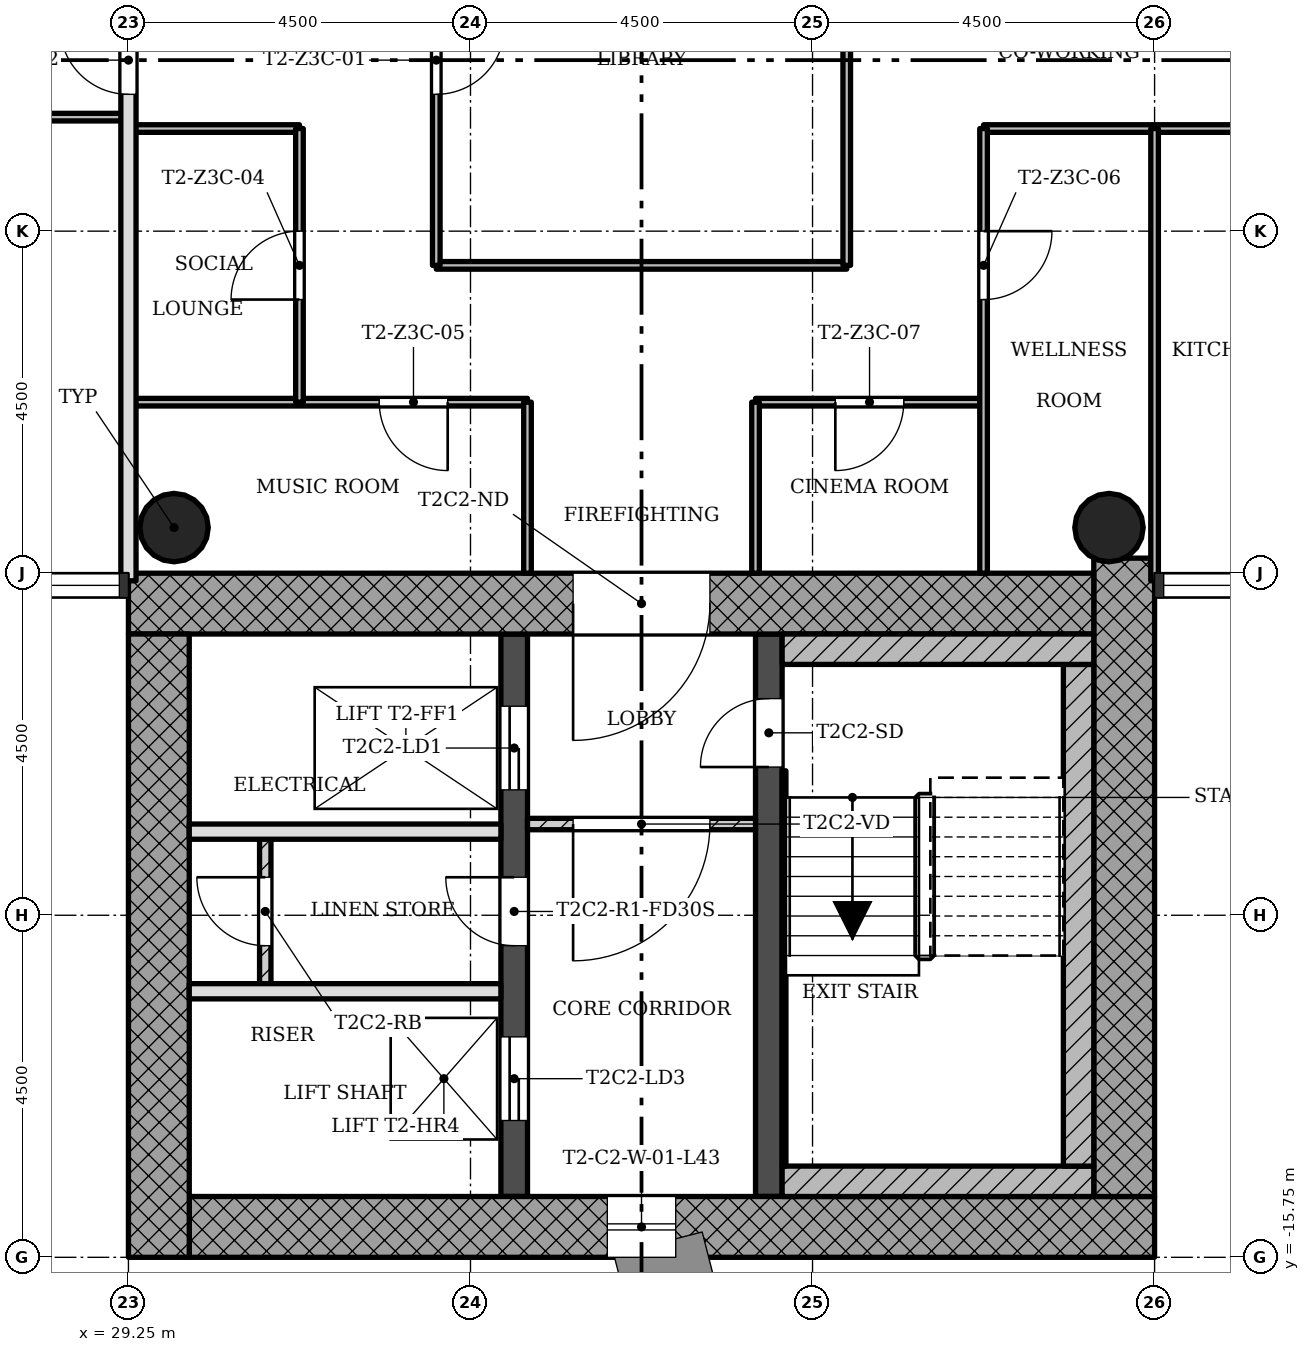
"""IFC4 building model, lengths in metres.
Left out: names, types, materials, properties, quantities, classifications, styles, units other than length and angle.
Written with IfcOpenShell. Run it as: python <this file> out.ifc"""

import sys

from ifc_helpers import new_model, si_unit, direction, frame, frame_2d, origin, origin_2d, place, context, subcontext, project, spatial, rectangle, hollow_circle, extrude, element, fill, save


model = new_model("IFC4")
c1 = context("Model", 3, precision=1e-05, world=origin(), true_north=direction((0.0, 1.0)))
c2 = subcontext(c1, "Body", "Model", "MODEL_VIEW")
j1 = project(units=[si_unit("LENGTHUNIT", "METRE"), si_unit("PLANEANGLEUNIT", "RADIAN")], contexts=[c1])
p1 = place(None, origin())
s1 = spatial("IfcSite", under=j1, at=p1, CompositionType="ELEMENT")
p2 = place(p1, origin())
s2 = spatial("IfcBuilding", under=s1, at=p2, CompositionType="ELEMENT")
p3 = place(p2, frame((0.0, 0.0, 157.5)))
s3 = spatial("IfcBuildingStorey", under=s2, at=p3, CompositionType="ELEMENT", Elevation=157.5)
p4 = place(p3, frame((30.05, -15.35, 0.0), z_axis=(0.0, 0.0, 1.0), x_axis=(1.0, 0.0, 0.0)))
e1 = element("IfcWall", 1, at=p4, inside=s3, PredefinedType="SHEAR", context=c2, shape_type="SweptSolid", body=[
    extrude(rectangle(XDim=12.7, YDim=0.8, at=frame_2d((6.35, 0.0))), origin(), (0.0, 0.0, 1.0), 3.4),
])
p5 = place(p4, frame((5.5, 0.0, 0.45)))
e2 = element("IfcOpeningElement", 2, at=p5, cuts=e1, PredefinedType="OPENING", context=c2, shape_type="SweptSolid", body=[
    extrude(rectangle(XDim=0.9, YDim=2.4, at=frame_2d((0.45, 1.2))), frame((0.0, 0.41, 0.0), z_axis=(0.0, -1.0, 0.0), x_axis=(1.0, 0.0, 0.0)), (0.0, 0.0, 1.0), 0.82),
])
p6 = place(p3, frame((42.35, -14.95, 0.0), z_axis=(0.0, 0.0, 1.0), x_axis=(0.0, 1.0, 0.0)))
e3 = element("IfcWall", 3, at=p6, inside=s3, PredefinedType="SHEAR", context=c2, shape_type="SweptSolid", body=[
    extrude(rectangle(XDim=8.398, YDim=0.8, at=frame_2d((4.199, 0.0))), origin(), (0.0, 0.0, 1.0), 3.4),
])
p7 = place(p3, frame((41.95, -7.15, 0.0), z_axis=(0.0, 0.0, 1.0), x_axis=(-1.0, 0.0, 0.0)))
e4 = element("IfcWall", 4, at=p7, inside=s3, PredefinedType="SHEAR", context=c2, shape_type="SweptSolid", body=[
    extrude(rectangle(XDim=12.7, YDim=0.8, at=frame_2d((6.35, 0.0))), origin(), (0.0, 0.0, 1.0), 3.4),
])
p8 = place(p7, frame((5.05, 0.0, 0.0)))
e5 = element("IfcOpeningElement", 5, at=p8, cuts=e4, PredefinedType="OPENING", context=c2, shape_type="SweptSolid", body=[
    extrude(rectangle(XDim=1.8, YDim=2.1, at=frame_2d((0.9, 1.05))), frame((0.0, 0.41, 0.0), z_axis=(0.0, -1.0, 0.0), x_axis=(1.0, 0.0, 0.0)), (0.0, 0.0, 1.0), 0.82),
])
p9 = place(p3, frame((29.65, -7.55, 0.0), z_axis=(0.0, 0.0, 1.0), x_axis=(0.0, -1.0, 0.0)))
e6 = element("IfcWall", 6, at=p9, inside=s3, PredefinedType="SHEAR", context=c2, shape_type="SweptSolid", body=[
    extrude(rectangle(XDim=8.2, YDim=0.8, at=frame_2d((4.1, 0.0))), origin(), (0.0, 0.0, 1.0), 3.4),
])
p10 = place(p3, frame((34.325, -14.95, 0.0), z_axis=(0.0, 0.0, 1.0), x_axis=(0.0, 1.0, 0.0)))
e7 = element("IfcWall", 7, at=p10, inside=s3, PredefinedType="SHEAR", context=c2, shape_type="SweptSolid", body=[
    extrude(rectangle(XDim=7.4, YDim=0.35, at=frame_2d((3.7, 0.0))), origin(), (0.0, 0.0, 1.0), 3.4),
])
p11 = place(p10, frame((5.35, 0.0, 0.0)))
e8 = element("IfcOpeningElement", 8, at=p11, cuts=e7, PredefinedType="OPENING", context=c2, shape_type="SweptSolid", body=[
    extrude(rectangle(XDim=1.1, YDim=2.1, at=frame_2d((0.55, 1.05))), frame((0.0, 0.185, 0.0), z_axis=(0.0, -1.0, 0.0), x_axis=(1.0, 0.0, 0.0)), (0.0, 0.0, 1.0), 0.37),
])
p12 = place(p10, frame((1.0, 0.0, 0.0)))
e9 = element("IfcOpeningElement", 9, at=p12, cuts=e7, PredefinedType="OPENING", context=c2, shape_type="SweptSolid", body=[
    extrude(rectangle(XDim=1.1, YDim=2.1, at=frame_2d((0.55, 1.05))), frame((0.0, 0.185, 0.0), z_axis=(0.0, -1.0, 0.0), x_axis=(1.0, 0.0, 0.0)), (0.0, 0.0, 1.0), 0.37),
])
p13 = place(p10, frame((3.3, 0.0, 0.0)))
e10 = element("IfcOpeningElement", 10, at=p13, cuts=e7, PredefinedType="OPENING", context=c2, shape_type="SweptSolid", body=[
    extrude(rectangle(XDim=0.9, YDim=2.1, at=frame_2d((0.45, 1.05))), frame((0.0, 0.185, 0.0), z_axis=(0.0, -1.0, 0.0), x_axis=(1.0, 0.0, 0.0)), (0.0, 0.0, 1.0), 0.37),
])
p14 = place(p3, frame((37.675, -14.95, 0.0), z_axis=(0.0, 0.0, 1.0), x_axis=(0.0, 1.0, 0.0)))
e11 = element("IfcWall", 11, at=p14, inside=s3, PredefinedType="SHEAR", context=c2, shape_type="SweptSolid", body=[
    extrude(rectangle(XDim=7.4, YDim=0.35, at=frame_2d((3.7, 0.0))), origin(), (0.0, 0.0, 1.0), 3.4),
])
p15 = place(p14, frame((5.65, 0.0, 0.0)))
e12 = element("IfcOpeningElement", 12, at=p15, cuts=e11, PredefinedType="OPENING", context=c2, shape_type="SweptSolid", body=[
    extrude(rectangle(XDim=0.9, YDim=2.1, at=frame_2d((0.45, 1.05))), frame((0.0, 0.185, 0.0), z_axis=(0.0, -1.0, 0.0), x_axis=(1.0, 0.0, 0.0)), (0.0, 0.0, 1.0), 0.37),
])
for number, where, z_axis, x_axis in (
    (13, (42.15, -6.15, 0.0), (0.0, 0.0, 1.0), (1.0, 0.0, 0.0)),
    (14, (29.85, -6.15, 0.0), (0.0, 0.0, 1.0), (1.0, 0.0, 0.0)),
):
    element("IfcColumn", number, at=place(p3, frame(where, z_axis=z_axis, x_axis=x_axis)), inside=s3, PredefinedType="COLUMN", context=c2, shape_type="SweptSolid", body=[
        extrude(hollow_circle(Radius=0.45, WallThickness=0.032, at=origin_2d()), origin(), (0.0, 0.0, 1.0), 3.4),
    ])
p16 = place(p3, frame((34.5, -10.05, 0.0), z_axis=(0.0, 0.0, 1.0), x_axis=(1.0, 0.0, 0.0)))
e15 = element("IfcWall", 15, at=p16, inside=s3, PredefinedType="PARTITIONING", context=c2, shape_type="SweptSolid", body=[
    extrude(rectangle(XDim=3.0, YDim=0.15, at=frame_2d((1.5, 0.0))), origin(), (0.0, 0.0, 1.0), 3.0),
])
p17 = place(p16, frame((0.6, 0.0, 0.0)))
e16 = element("IfcOpeningElement", 16, at=p17, cuts=e15, PredefinedType="OPENING", context=c2, shape_type="SweptSolid", body=[
    extrude(rectangle(XDim=1.8, YDim=2.1, at=frame_2d((0.9, 1.05))), frame((0.0, 0.085, 0.0), z_axis=(0.0, -1.0, 0.0), x_axis=(1.0, 0.0, 0.0)), (0.0, 0.0, 1.0), 0.17),
])
for number, where, z_axis, x_axis in (
    (17, (30.05, -12.25, 0.0), (0.0, 0.0, 1.0), (1.0, 0.0, 0.0)),
    (18, (30.05, -10.15, 0.0), (0.0, 0.0, 1.0), (1.0, 0.0, 0.0)),
):
    element("IfcWall", number, at=place(p3, frame(where, z_axis=z_axis, x_axis=x_axis)), inside=s3, PredefinedType="SOLIDWALL", context=c2, shape_type="SweptSolid", body=[
        extrude(rectangle(XDim=4.1, YDim=0.2, at=frame_2d((2.05, 0.0))), origin(), (0.0, 0.0, 1.0), 3.0),
    ])
p18 = place(p3, frame((31.05, -10.15, 0.0), z_axis=(0.0, 0.0, 1.0), x_axis=(0.0, -1.0, 0.0)))
e19 = element("IfcWall", 19, at=p18, inside=s3, PredefinedType="PARTITIONING", context=c2, shape_type="SweptSolid", body=[
    extrude(rectangle(XDim=2.1, YDim=0.15, at=frame_2d((1.05, 0.0))), origin(), (0.0, 0.0, 1.0), 3.0),
])
p19 = place(p18, frame((0.6, 0.0, 0.0)))
e20 = element("IfcOpeningElement", 20, at=p19, cuts=e19, PredefinedType="OPENING", context=c2, shape_type="SweptSolid", body=[
    extrude(rectangle(XDim=0.9, YDim=2.1, at=frame_2d((0.45, 1.05))), frame((0.0, 0.085, 0.0), z_axis=(0.0, -1.0, 0.0), x_axis=(1.0, 0.0, 0.0)), (0.0, 0.0, 1.0), 0.17),
])
p20 = place(p3, frame((40.5, -4.5, 0.0), z_axis=(0.0, 0.0, 1.0), x_axis=(-1.0, 0.0, 0.0)))
e21 = element("IfcWall", 21, at=p20, inside=s3, PredefinedType="PARTITIONING", context=c2, shape_type="SweptSolid", body=[
    extrude(rectangle(XDim=3.0, YDim=0.1, at=frame_2d((1.5, 0.0))), origin(), (0.0, 0.0, 1.0), 3.0),
])
p21 = place(p20, frame((1.05, 0.0, 0.0)))
e22 = element("IfcOpeningElement", 22, at=p21, cuts=e21, PredefinedType="OPENING", context=c2, shape_type="SweptSolid", body=[
    extrude(rectangle(XDim=0.9, YDim=2.1, at=frame_2d((0.45, 1.05))), frame((0.0, 0.06, 0.0), z_axis=(0.0, -1.0, 0.0), x_axis=(1.0, 0.0, 0.0)), (0.0, 0.0, 1.0), 0.12),
])
p22 = place(p3, frame((34.5, -4.5, 0.0), z_axis=(0.0, 0.0, 1.0), x_axis=(-1.0, 0.0, 0.0)))
e23 = element("IfcWall", 23, at=p22, inside=s3, PredefinedType="PARTITIONING", context=c2, shape_type="SweptSolid", body=[
    extrude(rectangle(XDim=5.25, YDim=0.1, at=frame_2d((2.625, 0.0))), origin(), (0.0, 0.0, 1.0), 3.0),
])
p23 = place(p22, frame((1.05, 0.0, 0.0)))
e24 = element("IfcOpeningElement", 24, at=p23, cuts=e23, PredefinedType="OPENING", context=c2, shape_type="SweptSolid", body=[
    extrude(rectangle(XDim=0.9, YDim=2.1, at=frame_2d((0.45, 1.05))), frame((0.0, 0.06, 0.0), z_axis=(0.0, -1.0, 0.0), x_axis=(1.0, 0.0, 0.0)), (0.0, 0.0, 1.0), 0.12),
])
p24 = place(p3, frame((38.7, -2.7, 0.0), z_axis=(0.0, 0.0, 1.0), x_axis=(-1.0, 0.0, 0.0)))
e25 = element("IfcWall", 25, at=p24, inside=s3, PredefinedType="PARTITIONING", context=c2, shape_type="SweptSolid", body=[
    extrude(rectangle(XDim=5.4, YDim=0.1, at=frame_2d((2.7, 0.0))), origin(), (0.0, 0.0, 1.0), 3.0),
])
p25 = place(p3, frame((44.55, -0.9, 0.0), z_axis=(0.0, 0.0, 1.0), x_axis=(-1.0, 0.0, 0.0)))
e26 = element("IfcWall", 26, at=p25, inside=s3, PredefinedType="PARTITIONING", context=c2, shape_type="SweptSolid", body=[
    extrude(rectangle(XDim=4.05, YDim=0.1, at=frame_2d((2.025, 0.0))), origin(), (0.0, 0.0, 1.0), 3.0),
])
p26 = place(p3, frame((31.5, -0.9, 0.0), z_axis=(0.0, 0.0, 1.0), x_axis=(-1.0, 0.0, 0.0)))
e27 = element("IfcWall", 27, at=p26, inside=s3, PredefinedType="PARTITIONING", context=c2, shape_type="SweptSolid", body=[
    extrude(rectangle(XDim=2.25, YDim=0.1, at=frame_2d((1.125, 0.0))), origin(), (0.0, 0.0, 1.0), 3.0),
])
p27 = place(p3, frame((29.25, -0.75, 0.0), z_axis=(0.0, 0.0, 1.0), x_axis=(-1.0, 0.0, 0.0)))
e28 = element("IfcWall", 28, at=p27, inside=s3, PredefinedType="PARTITIONING", context=c2, shape_type="SweptSolid", body=[
    extrude(rectangle(XDim=4.5, YDim=0.1, at=frame_2d((2.25, 0.0))), origin(), (0.0, 0.0, 1.0), 3.0),
])
p28 = place(p27, frame((1.8, 0.0, 0.0)))
e29 = element("IfcOpeningElement", 29, at=p28, cuts=e28, PredefinedType="OPENING", context=c2, shape_type="SweptSolid", body=[
    extrude(rectangle(XDim=0.9, YDim=2.1, at=frame_2d((0.45, 1.05))), frame((0.0, 0.06, 0.0), z_axis=(0.0, -1.0, 0.0), x_axis=(1.0, 0.0, 0.0)), (0.0, 0.0, 1.0), 0.12),
])
p29 = place(p3, frame((42.75, -6.85, 0.0), z_axis=(0.0, 0.0, 1.0), x_axis=(0.0, 1.0, 0.0)))
e30 = element("IfcWall", 30, at=p29, inside=s3, PredefinedType="PARTITIONING", context=c2, shape_type="SweptSolid", body=[
    extrude(rectangle(XDim=5.95, YDim=0.1, at=frame_2d((2.975, 0.0))), origin(), (0.0, 0.0, 1.0), 3.0),
])
p30 = place(p3, frame((40.5, -6.75, 0.0), z_axis=(0.0, 0.0, 1.0), x_axis=(0.0, 1.0, 0.0)))
e31 = element("IfcWall", 31, at=p30, inside=s3, PredefinedType="PARTITIONING", context=c2, shape_type="SweptSolid", body=[
    extrude(rectangle(XDim=5.85, YDim=0.1, at=frame_2d((2.925, 0.0))), origin(), (0.0, 0.0, 1.0), 3.0),
])
p31 = place(p30, frame((3.6, 0.0, 0.0)))
e32 = element("IfcOpeningElement", 32, at=p31, cuts=e31, PredefinedType="OPENING", context=c2, shape_type="SweptSolid", body=[
    extrude(rectangle(XDim=0.9, YDim=2.1, at=frame_2d((0.45, 1.05))), frame((0.0, 0.06, 0.0), z_axis=(0.0, -1.0, 0.0), x_axis=(1.0, 0.0, 0.0)), (0.0, 0.0, 1.0), 0.12),
])
p32 = place(p3, frame((38.7, -2.7, 0.0), z_axis=(0.0, 0.0, 1.0), x_axis=(0.0, 1.0, 0.0)))
e33 = element("IfcWall", 33, at=p32, inside=s3, PredefinedType="PARTITIONING", context=c2, shape_type="SweptSolid", body=[
    extrude(rectangle(XDim=5.4, YDim=0.1, at=frame_2d((2.7, 0.0))), origin(), (0.0, 0.0, 1.0), 3.0),
])
for number, where, z_axis, x_axis in (
    (34, (37.5, -6.75, 0.0), (0.0, 0.0, 1.0), (0.0, 1.0, 0.0)),
    (35, (34.5, -6.75, 0.0), (0.0, 0.0, 1.0), (0.0, 1.0, 0.0)),
):
    element("IfcWall", number, at=place(p3, frame(where, z_axis=z_axis, x_axis=x_axis)), inside=s3, PredefinedType="PARTITIONING", context=c2, shape_type="SweptSolid", body=[
        extrude(rectangle(XDim=2.25, YDim=0.1, at=frame_2d((1.125, 0.0))), origin(), (0.0, 0.0, 1.0), 3.0),
    ])
p33 = place(p3, frame((33.3, -2.7, 0.0), z_axis=(0.0, 0.0, 1.0), x_axis=(0.0, 1.0, 0.0)))
e36 = element("IfcWall", 36, at=p33, inside=s3, PredefinedType="PARTITIONING", context=c2, shape_type="SweptSolid", body=[
    extrude(rectangle(XDim=5.4, YDim=0.1, at=frame_2d((2.7, 0.0))), origin(), (0.0, 0.0, 1.0), 3.0),
])
p34 = place(p33, frame((2.25, 0.0, 0.0)))
e37 = element("IfcOpeningElement", 37, at=p34, cuts=e36, PredefinedType="OPENING", context=c2, shape_type="SweptSolid", body=[
    extrude(rectangle(XDim=0.9, YDim=2.1, at=frame_2d((0.45, 1.05))), frame((0.0, 0.06, 0.0), z_axis=(0.0, -1.0, 0.0), x_axis=(1.0, 0.0, 0.0)), (0.0, 0.0, 1.0), 0.12),
])
p35 = place(p3, frame((31.5, -4.5, 0.0), z_axis=(0.0, 0.0, 1.0), x_axis=(0.0, 1.0, 0.0)))
e38 = element("IfcWall", 38, at=p35, inside=s3, PredefinedType="PARTITIONING", context=c2, shape_type="SweptSolid", body=[
    extrude(rectangle(XDim=3.6, YDim=0.1, at=frame_2d((1.8, 0.0))), origin(), (0.0, 0.0, 1.0), 3.0),
])
p36 = place(p35, frame((1.35, 0.0, 0.0)))
e39 = element("IfcOpeningElement", 39, at=p36, cuts=e38, PredefinedType="OPENING", context=c2, shape_type="SweptSolid", body=[
    extrude(rectangle(XDim=0.9, YDim=2.1, at=frame_2d((0.45, 1.05))), frame((0.0, 0.06, 0.0), z_axis=(0.0, -1.0, 0.0), x_axis=(1.0, 0.0, 0.0)), (0.0, 0.0, 1.0), 0.12),
])
p37 = place(p3, frame((29.25, -6.85, 0.0), z_axis=(0.0, 0.0, 1.0), x_axis=(0.0, 1.0, 0.0)))
e40 = element("IfcWall", 40, at=p37, inside=s3, PredefinedType="SOLIDWALL", context=c2, shape_type="SweptSolid", body=[
    extrude(rectangle(XDim=13.7, YDim=0.2, at=frame_2d((6.85, 0.0))), origin(), (0.0, 0.0, 1.0), 3.0),
])
p38 = place(p37, frame((6.4, 0.0, 0.0)))
e41 = element("IfcOpeningElement", 41, at=p38, cuts=e40, PredefinedType="OPENING", context=c2, shape_type="SweptSolid", body=[
    extrude(rectangle(XDim=0.9, YDim=2.1, at=frame_2d((0.45, 1.05))), frame((0.0, 0.11, 0.0), z_axis=(0.0, -1.0, 0.0), x_axis=(1.0, 0.0, 0.0)), (0.0, 0.0, 1.0), 0.22),
])
p39 = place(p3, frame((37.85, -14.75, 0.0), z_axis=(0.0, 0.0, 1.0), x_axis=(1.0, 0.0, 0.0)))
e42 = element("IfcWall", 42, at=p39, inside=s3, PredefinedType="SHEAR", context=c2, shape_type="SweptSolid", body=[
    extrude(rectangle(XDim=4.1, YDim=0.4, at=frame_2d((2.05, 0.0))), origin(), (0.0, 0.0, 1.0), 3.4),
])
p40 = place(p3, frame((41.75, -7.95, 0.0), z_axis=(0.0, 0.0, 1.0), x_axis=(0.0, -1.0, 0.0)))
e43 = element("IfcWall", 43, at=p40, inside=s3, PredefinedType="SHEAR", context=c2, shape_type="SweptSolid", body=[
    extrude(rectangle(XDim=6.6, YDim=0.4, at=frame_2d((3.3, 0.0))), origin(), (0.0, 0.0, 1.0), 3.4),
])
p41 = place(p3, frame((37.85, -7.75, 0.0), z_axis=(0.0, 0.0, 1.0), x_axis=(1.0, 0.0, 0.0)))
e44 = element("IfcWall", 44, at=p41, inside=s3, PredefinedType="SHEAR", context=c2, shape_type="SweptSolid", body=[
    extrude(rectangle(XDim=4.1, YDim=0.4, at=frame_2d((2.05, 0.0))), origin(), (0.0, 0.0, 1.0), 3.4),
])
p42 = place(p3, frame((37.875, -9.35, 0.0), z_axis=(0.0, 0.0, 1.0), x_axis=(0.0, -1.0, 0.0)))
e45 = element("IfcWall", 45, at=p42, inside=s3, PredefinedType="SHEAR", context=c2, shape_type="SweptSolid", body=[
    extrude(rectangle(XDim=5.2, YDim=0.05, at=frame_2d((2.6, 0.0))), origin(), (0.0, 0.0, 1.0), 3.4),
])
p43 = place(p5, origin())
e46 = element("IfcWindow", 46, at=p43, inside=s3, PartitioningType="SINGLE_PANEL", PredefinedType="WINDOW", context=c2, shape_type="SweptSolid", body=[
    extrude(rectangle(XDim=0.9, YDim=2.4, at=frame_2d((0.45, 1.2))), frame((0.0, 0.03, 0.0), z_axis=(0.0, -1.0, 0.0), x_axis=(1.0, 0.0, 0.0)), (0.0, 0.0, 1.0), 0.06),
])
fill(e2, e46)
p44 = place(p17, origin())
e47 = element("IfcDoor", 47, at=p44, inside=s3, OperationType="SINGLE_SWING_LEFT", PredefinedType="DOOR", context=c2, shape_type="SweptSolid", body=[
    extrude(rectangle(XDim=1.8, YDim=2.1, at=frame_2d((0.9, 1.05))), frame((0.0, 0.025, 0.0), z_axis=(0.0, -1.0, 0.0), x_axis=(1.0, 0.0, 0.0)), (0.0, 0.0, 1.0), 0.05),
])
fill(e16, e47)
p45 = place(p19, origin())
e48 = element("IfcDoor", 48, at=p45, inside=s3, OperationType="SINGLE_SWING_LEFT", PredefinedType="DOOR", context=c2, shape_type="SweptSolid", body=[
    extrude(rectangle(XDim=0.9, YDim=2.1, at=frame_2d((0.45, 1.05))), frame((0.0, 0.025, 0.0), z_axis=(0.0, -1.0, 0.0), x_axis=(1.0, 0.0, 0.0)), (0.0, 0.0, 1.0), 0.05),
])
fill(e20, e48)
p46 = place(p34, origin())
e49 = element("IfcDoor", 49, at=p46, inside=s3, OperationType="SINGLE_SWING_RIGHT", PredefinedType="DOOR", context=c2, shape_type="SweptSolid", body=[
    extrude(rectangle(XDim=0.9, YDim=2.1, at=frame_2d((0.45, 1.05))), frame((0.0, 0.025, 0.0), z_axis=(0.0, -1.0, 0.0), x_axis=(1.0, 0.0, 0.0)), (0.0, 0.0, 1.0), 0.05),
])
fill(e37, e49)
p47 = place(p36, origin())
e50 = element("IfcDoor", 50, at=p47, inside=s3, OperationType="SINGLE_SWING_RIGHT", PredefinedType="DOOR", context=c2, shape_type="SweptSolid", body=[
    extrude(rectangle(XDim=0.9, YDim=2.1, at=frame_2d((0.45, 1.05))), frame((0.0, 0.025, 0.0), z_axis=(0.0, -1.0, 0.0), x_axis=(1.0, 0.0, 0.0)), (0.0, 0.0, 1.0), 0.05),
])
fill(e39, e50)
p48 = place(p23, origin())
e51 = element("IfcDoor", 51, at=p48, inside=s3, OperationType="SINGLE_SWING_RIGHT", PredefinedType="DOOR", context=c2, shape_type="SweptSolid", body=[
    extrude(rectangle(XDim=0.9, YDim=2.1, at=frame_2d((0.45, 1.05))), frame((0.0, 0.025, 0.0), z_axis=(0.0, -1.0, 0.0), x_axis=(1.0, 0.0, 0.0)), (0.0, 0.0, 1.0), 0.05),
])
fill(e24, e51)
p49 = place(p31, origin())
e52 = element("IfcDoor", 52, at=p49, inside=s3, OperationType="SINGLE_SWING_RIGHT", PredefinedType="DOOR", context=c2, shape_type="SweptSolid", body=[
    extrude(rectangle(XDim=0.9, YDim=2.1, at=frame_2d((0.45, 1.05))), frame((0.0, 0.025, 0.0), z_axis=(0.0, -1.0, 0.0), x_axis=(1.0, 0.0, 0.0)), (0.0, 0.0, 1.0), 0.05),
])
fill(e32, e52)
p50 = place(p21, origin())
e53 = element("IfcDoor", 53, at=p50, inside=s3, OperationType="SINGLE_SWING_LEFT", PredefinedType="DOOR", context=c2, shape_type="SweptSolid", body=[
    extrude(rectangle(XDim=0.9, YDim=2.1, at=frame_2d((0.45, 1.05))), frame((0.0, 0.025, 0.0), z_axis=(0.0, -1.0, 0.0), x_axis=(1.0, 0.0, 0.0)), (0.0, 0.0, 1.0), 0.05),
])
fill(e22, e53)
p51 = place(p38, origin())
e54 = element("IfcDoor", 54, at=p51, inside=s3, OperationType="SINGLE_SWING_LEFT", PredefinedType="DOOR", context=c2, shape_type="SweptSolid", body=[
    extrude(rectangle(XDim=0.9, YDim=2.1, at=frame_2d((0.45, 1.05))), frame((0.0, 0.025, 0.0), z_axis=(0.0, -1.0, 0.0), x_axis=(1.0, 0.0, 0.0)), (0.0, 0.0, 1.0), 0.05),
])
fill(e41, e54)
p52 = place(p15, origin())
e55 = element("IfcDoor", 55, at=p52, inside=s3, OperationType="SINGLE_SWING_RIGHT", PredefinedType="DOOR", context=c2, shape_type="SweptSolid", body=[
    extrude(rectangle(XDim=0.9, YDim=2.1, at=frame_2d((0.45, 1.05))), frame((0.0, 0.025, 0.0), z_axis=(0.0, -1.0, 0.0), x_axis=(1.0, 0.0, 0.0)), (0.0, 0.0, 1.0), 0.05),
])
fill(e12, e55)
p53 = place(p11, origin())
e56 = element("IfcDoor", 56, at=p53, inside=s3, OperationType="SLIDING_TO_LEFT", PredefinedType="DOOR", context=c2, shape_type="SweptSolid", body=[
    extrude(rectangle(XDim=1.1, YDim=2.1, at=frame_2d((0.55, 1.05))), frame((0.0, 0.025, 0.0), z_axis=(0.0, -1.0, 0.0), x_axis=(1.0, 0.0, 0.0)), (0.0, 0.0, 1.0), 0.05),
])
fill(e8, e56)
p54 = place(p12, origin())
e57 = element("IfcDoor", 57, at=p54, inside=s3, OperationType="SLIDING_TO_LEFT", PredefinedType="DOOR", context=c2, shape_type="SweptSolid", body=[
    extrude(rectangle(XDim=1.1, YDim=2.1, at=frame_2d((0.55, 1.05))), frame((0.0, 0.025, 0.0), z_axis=(0.0, -1.0, 0.0), x_axis=(1.0, 0.0, 0.0)), (0.0, 0.0, 1.0), 0.05),
])
fill(e9, e57)
p55 = place(p13, origin())
e58 = element("IfcDoor", 58, at=p55, inside=s3, OperationType="SINGLE_SWING_LEFT", PredefinedType="DOOR", context=c2, shape_type="SweptSolid", body=[
    extrude(rectangle(XDim=0.9, YDim=2.1, at=frame_2d((0.45, 1.05))), frame((0.0, 0.025, 0.0), z_axis=(0.0, -1.0, 0.0), x_axis=(1.0, 0.0, 0.0)), (0.0, 0.0, 1.0), 0.05),
])
fill(e10, e58)
p56 = place(p8, origin())
e59 = element("IfcDoor", 59, at=p56, inside=s3, OperationType="SINGLE_SWING_LEFT", PredefinedType="DOOR", context=c2, shape_type="SweptSolid", body=[
    extrude(rectangle(XDim=1.8, YDim=2.1, at=frame_2d((0.9, 1.05))), frame((0.0, 0.025, 0.0), z_axis=(0.0, -1.0, 0.0), x_axis=(1.0, 0.0, 0.0)), (0.0, 0.0, 1.0), 0.05),
])
fill(e5, e59)
save(model, sys.argv[1])
